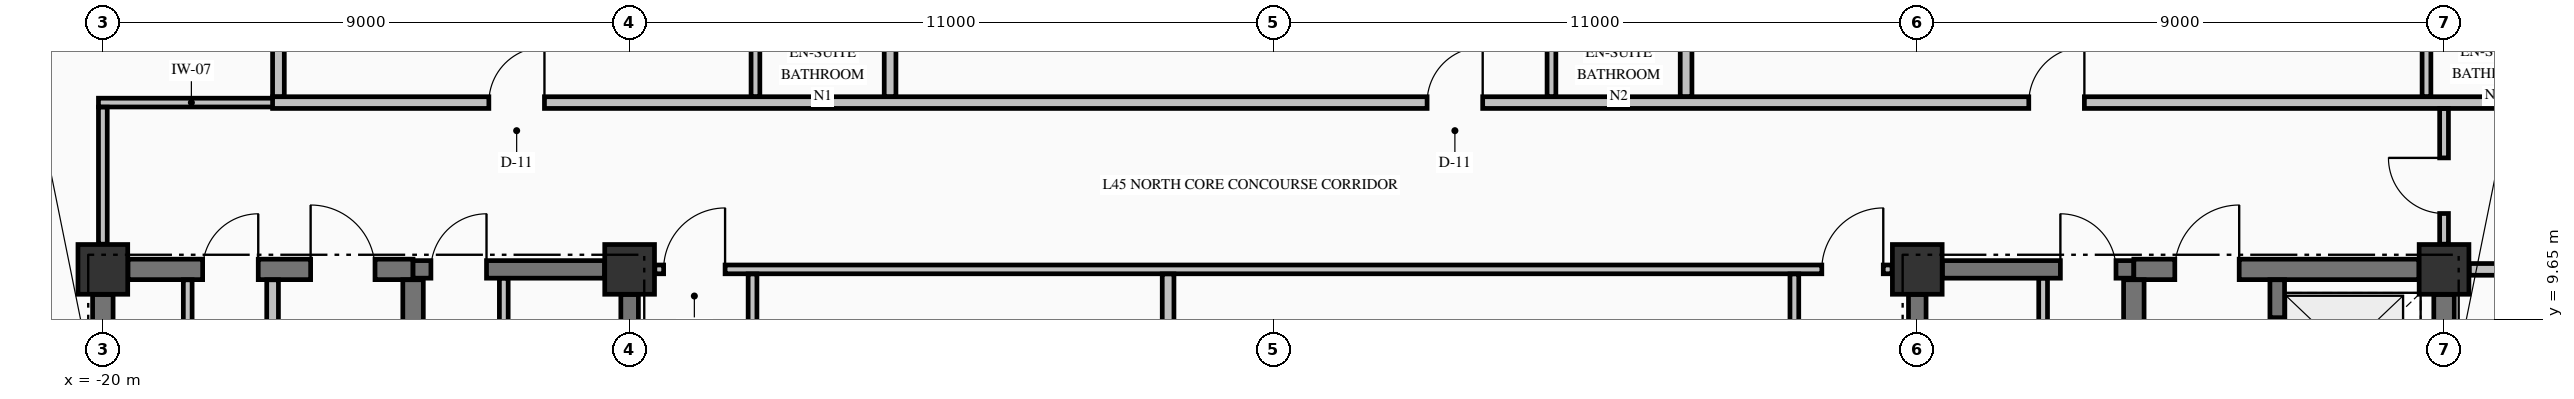
"""IFC4 building model, lengths in metres.
Left out: names, types, materials, properties, quantities, classifications, styles, units other than length and angle.
Written with IfcOpenShell. Run it as: python <this file> out.ifc"""

import sys

from ifc_helpers import new_model, si_unit, direction, frame, frame_2d, origin, origin_2d, place, context, subcontext, project, spatial, rectangle, extrude, element, fill, save


model = new_model("IFC4")
c1 = context("Model", 3, precision=1e-05, world=origin(), true_north=direction((0.0, 1.0)))
c2 = subcontext(c1, "Body", "Model", "MODEL_VIEW")
j1 = project(units=[si_unit("LENGTHUNIT", "METRE"), si_unit("PLANEANGLEUNIT", "RADIAN")], contexts=[c1])
p1 = place(None, origin())
s1 = spatial("IfcSite", under=j1, at=p1, CompositionType="ELEMENT")
p2 = place(p1, origin())
s2 = spatial("IfcBuilding", under=s1, at=p2, CompositionType="ELEMENT")
p3 = place(p2, frame((0.0, 0.0, 176.26)))
s3 = spatial("IfcBuildingStorey", under=s2, at=p3, CompositionType="ELEMENT", Elevation=176.26)
for number, where, z_axis, x_axis in (
    (1, (-20.0, 10.5, -0.275), (0.0, 0.0, 1.0), (1.0, 0.0, 0.0)),
    (2, (-11.0, 10.5, -0.275), (0.0, 0.0, 1.0), (1.0, 0.0, 0.0)),
    (3, (11.0, 10.5, -0.275), (0.0, 0.0, 1.0), (1.0, 0.0, 0.0)),
    (4, (20.0, 10.5, -0.275), (0.0, 0.0, 1.0), (1.0, 0.0, 0.0)),
):
    element("IfcColumn", number, at=place(p3, frame(where, z_axis=z_axis, x_axis=x_axis)), inside=s3, PredefinedType="COLUMN", context=c2, shape_type="SweptSolid", body=[
        extrude(rectangle(XDim=0.85, YDim=0.85, at=origin_2d()), origin(), (0.0, 0.0, 1.0), 3.425),
    ])
p4 = place(p3, frame((-19.571, 10.5, 0.0), z_axis=(0.0, 0.0, 1.0), x_axis=(1.0, 0.0, 0.0)))
e5 = element("IfcWall", 5, at=p4, inside=s3, PredefinedType="SHEAR", context=c2, shape_type="SweptSolid", body=[
    extrude(rectangle(XDim=4.871, YDim=0.35, at=frame_2d((2.436, 0.0))), origin(), (0.0, 0.0, 1.0), 3.15),
])
p5 = place(p4, frame((3.121, 0.0, 0.0)))
e6 = element("IfcOpeningElement", 6, at=p5, cuts=e5, PredefinedType="OPENING", context=c2, shape_type="SweptSolid", body=[
    extrude(rectangle(XDim=1.1, YDim=2.15, at=frame_2d((0.55, 1.075))), frame((0.0, 0.185, 0.0), z_axis=(0.0, -1.0, 0.0), x_axis=(1.0, 0.0, 0.0)), (0.0, 0.0, 1.0), 0.37),
])
p6 = place(p4, frame((1.276, 0.0, 0.0)))
e7 = element("IfcOpeningElement", 7, at=p6, cuts=e5, PredefinedType="OPENING", context=c2, shape_type="SweptSolid", body=[
    extrude(rectangle(XDim=0.95, YDim=2.15, at=frame_2d((0.475, 1.075))), frame((0.0, 0.185, 0.0), z_axis=(0.0, -1.0, 0.0), x_axis=(1.0, 0.0, 0.0)), (0.0, 0.0, 1.0), 0.37),
])
p7 = place(p3, frame((-14.7, 10.5, 0.0), z_axis=(0.0, 0.0, 1.0), x_axis=(1.0, 0.0, 0.0)))
e8 = element("IfcWall", 8, at=p7, inside=s3, PredefinedType="SHEAR", context=c2, shape_type="SweptSolid", body=[
    extrude(rectangle(XDim=3.271, YDim=0.3, at=frame_2d((1.635, 0.0))), origin(), (0.0, 0.0, 1.0), 3.15),
])
p8 = place(p7, frame((0.305, 0.0, 0.0)))
e9 = element("IfcOpeningElement", 9, at=p8, cuts=e8, PredefinedType="OPENING", context=c2, shape_type="SweptSolid", body=[
    extrude(rectangle(XDim=0.95, YDim=2.15, at=frame_2d((0.475, 1.075))), frame((0.0, 0.16, 0.0), z_axis=(0.0, -1.0, 0.0), x_axis=(1.0, 0.0, 0.0)), (0.0, 0.0, 1.0), 0.32),
])
p9 = place(p3, frame((11.429, 10.5, 0.0), z_axis=(0.0, 0.0, 1.0), x_axis=(1.0, 0.0, 0.0)))
e10 = element("IfcWall", 10, at=p9, inside=s3, PredefinedType="SHEAR", context=c2, shape_type="SweptSolid", body=[
    extrude(rectangle(XDim=3.271, YDim=0.3, at=frame_2d((1.635, 0.0))), origin(), (0.0, 0.0, 1.0), 3.15),
])
p10 = place(p9, frame((2.016, 0.0, 0.0)))
e11 = element("IfcOpeningElement", 11, at=p10, cuts=e10, PredefinedType="OPENING", context=c2, shape_type="SweptSolid", body=[
    extrude(rectangle(XDim=0.95, YDim=2.15, at=frame_2d((0.475, 1.075))), frame((0.0, 0.16, 0.0), z_axis=(0.0, -1.0, 0.0), x_axis=(1.0, 0.0, 0.0)), (0.0, 0.0, 1.0), 0.32),
])
p11 = place(p3, frame((14.7, 10.5, 0.0), z_axis=(0.0, 0.0, 1.0), x_axis=(1.0, 0.0, 0.0)))
e12 = element("IfcWall", 12, at=p11, inside=s3, PredefinedType="SHEAR", context=c2, shape_type="SweptSolid", body=[
    extrude(rectangle(XDim=4.871, YDim=0.35, at=frame_2d((2.436, 0.0))), origin(), (0.0, 0.0, 1.0), 3.15),
])
p12 = place(p11, frame((0.7, 0.0, 0.0)))
e13 = element("IfcOpeningElement", 13, at=p12, cuts=e12, PredefinedType="OPENING", context=c2, shape_type="SweptSolid", body=[
    extrude(rectangle(XDim=1.1, YDim=2.15, at=frame_2d((0.55, 1.075))), frame((0.0, 0.185, 0.0), z_axis=(0.0, -1.0, 0.0), x_axis=(1.0, 0.0, 0.0)), (0.0, 0.0, 1.0), 0.37),
])
p13 = place(p3, frame((-10.569, 10.5, 0.0), z_axis=(0.0, 0.0, 1.0), x_axis=(1.0, 0.0, 0.0)))
e14 = element("IfcWall", 14, at=p13, inside=s3, PredefinedType="PARTITIONING", context=c2, shape_type="SweptSolid", body=[
    extrude(rectangle(XDim=21.138, YDim=0.15, at=frame_2d((10.569, 0.0))), origin(), (0.0, 0.0, 1.0), 3.15),
])
p14 = place(p13, frame((0.15, 0.0, 0.0)))
e15 = element("IfcOpeningElement", 15, at=p14, cuts=e14, PredefinedType="OPENING", context=c2, shape_type="SweptSolid", body=[
    extrude(rectangle(XDim=1.05, YDim=2.15, at=frame_2d((0.525, 1.075))), frame((0.0, 0.085, 0.0), z_axis=(0.0, -1.0, 0.0), x_axis=(1.0, 0.0, 0.0)), (0.0, 0.0, 1.0), 0.17),
])
p15 = place(p13, frame((19.938, 0.0, 0.0)))
e16 = element("IfcOpeningElement", 16, at=p15, cuts=e14, PredefinedType="OPENING", context=c2, shape_type="SweptSolid", body=[
    extrude(rectangle(XDim=1.05, YDim=2.15, at=frame_2d((0.525, 1.075))), frame((0.0, 0.085, 0.0), z_axis=(0.0, -1.0, 0.0), x_axis=(1.0, 0.0, 0.0)), (0.0, 0.0, 1.0), 0.17),
])
p16 = place(p3, frame((20.431, 10.5, 0.0), z_axis=(0.0, 0.0, 1.0), x_axis=(1.0, 0.0, 0.0)))
e17 = element("IfcWall", 17, at=p16, inside=s3, PredefinedType="PARTITIONING", context=c2, shape_type="SweptSolid", body=[
    extrude(rectangle(XDim=6.404, YDim=0.2, at=frame_2d((3.202, 0.0))), origin(), (0.0, 0.0, 1.0), 3.15),
])
p17 = place(p16, frame((2.594, 0.0, 0.0)))
e18 = element("IfcOpeningElement", 18, at=p17, cuts=e17, PredefinedType="OPENING", context=c2, shape_type="SweptSolid", body=[
    extrude(rectangle(XDim=0.95, YDim=2.15, at=frame_2d((0.475, 1.075))), frame((0.0, 0.11, 0.0), z_axis=(0.0, -1.0, 0.0), x_axis=(1.0, 0.0, 0.0)), (0.0, 0.0, 1.0), 0.22),
])
p18 = place(p3, frame((-20.075, 13.35, 0.0), z_axis=(0.0, 0.0, 1.0), x_axis=(1.0, 0.0, 0.0)))
e19 = element("IfcWall", 19, at=p18, inside=s3, PredefinedType="PARTITIONING", context=c2, shape_type="SweptSolid", body=[
    extrude(rectangle(XDim=3.175, YDim=0.15, at=frame_2d((1.587, 0.0))), origin(), (0.0, 0.0, 1.0), 3.15),
])
p19 = place(p3, frame((-17.1, 13.35, 0.0), z_axis=(0.0, 0.0, 1.0), x_axis=(1.0, 0.0, 0.0)))
e20 = element("IfcWall", 20, at=p19, inside=s3, PredefinedType="PARTITIONING", context=c2, shape_type="SweptSolid", body=[
    extrude(rectangle(XDim=39.2, YDim=0.2, at=frame_2d((19.6, 0.0))), origin(), (0.0, 0.0, 1.0), 3.15),
])
p20 = place(p19, frame((3.695, 0.0, 0.0)))
e21 = element("IfcOpeningElement", 21, at=p20, cuts=e20, PredefinedType="OPENING", context=c2, shape_type="SweptSolid", body=[
    extrude(rectangle(XDim=0.95, YDim=2.15, at=frame_2d((0.475, 1.075))), frame((0.0, 0.11, 0.0), z_axis=(0.0, -1.0, 0.0), x_axis=(1.0, 0.0, 0.0)), (0.0, 0.0, 1.0), 0.22),
])
p21 = place(p19, frame((19.725, 0.0, 0.0)))
e22 = element("IfcOpeningElement", 22, at=p21, cuts=e20, PredefinedType="OPENING", context=c2, shape_type="SweptSolid", body=[
    extrude(rectangle(XDim=0.95, YDim=2.15, at=frame_2d((0.475, 1.075))), frame((0.0, 0.11, 0.0), z_axis=(0.0, -1.0, 0.0), x_axis=(1.0, 0.0, 0.0)), (0.0, 0.0, 1.0), 0.22),
])
p22 = place(p19, frame((30.005, 0.0, 0.0)))
e23 = element("IfcOpeningElement", 23, at=p22, cuts=e20, PredefinedType="OPENING", context=c2, shape_type="SweptSolid", body=[
    extrude(rectangle(XDim=0.95, YDim=2.15, at=frame_2d((0.475, 1.075))), frame((0.0, 0.11, 0.0), z_axis=(0.0, -1.0, 0.0), x_axis=(1.0, 0.0, 0.0)), (0.0, 0.0, 1.0), 0.22),
])
p23 = place(p3, frame((-20.0, 5.327, 0.0), z_axis=(0.0, 0.0, 1.0), x_axis=(0.0, 1.0, 0.0)))
e24 = element("IfcWall", 24, at=p23, inside=s3, PredefinedType="SHEAR", context=c2, shape_type="SweptSolid", body=[
    extrude(rectangle(XDim=4.744, YDim=0.35, at=frame_2d((2.372, 0.0))), origin(), (0.0, 0.0, 1.0), 3.15),
])
p24 = place(p3, frame((-14.7, 5.852, 0.0), z_axis=(0.0, 0.0, 1.0), x_axis=(0.0, 1.0, 0.0)))
e25 = element("IfcWall", 25, at=p24, inside=s3, PredefinedType="SHEAR", context=c2, shape_type="SweptSolid", body=[
    extrude(rectangle(XDim=4.471, YDim=0.35, at=frame_2d((2.235, 0.0))), origin(), (0.0, 0.0, 1.0), 3.15),
])
for number, where, z_axis, x_axis in (
    (26, (-11.0, 5.852, 0.0), (0.0, 0.0, 1.0), (0.0, 1.0, 0.0)),
    (27, (11.0, 5.852, 0.0), (0.0, 0.0, 1.0), (0.0, 1.0, 0.0)),
):
    element("IfcWall", number, at=place(p3, frame(where, z_axis=z_axis, x_axis=x_axis)), inside=s3, PredefinedType="SHEAR", context=c2, shape_type="SweptSolid", body=[
        extrude(rectangle(XDim=4.219, YDim=0.3, at=frame_2d((2.109, 0.0))), origin(), (0.0, 0.0, 1.0), 3.15),
    ])
p25 = place(p3, frame((14.7, 5.852, 0.0), z_axis=(0.0, 0.0, 1.0), x_axis=(0.0, 1.0, 0.0)))
e28 = element("IfcWall", 28, at=p25, inside=s3, PredefinedType="SHEAR", context=c2, shape_type="SweptSolid", body=[
    extrude(rectangle(XDim=4.471, YDim=0.35, at=frame_2d((2.235, 0.0))), origin(), (0.0, 0.0, 1.0), 3.15),
])
p26 = place(p3, frame((17.15, 7.877, 0.0), z_axis=(0.0, 0.0, 1.0), x_axis=(0.0, 1.0, 0.0)))
e29 = element("IfcWall", 29, at=p26, inside=s3, PredefinedType="SOLIDWALL", context=c2, shape_type="SweptSolid", body=[
    extrude(rectangle(XDim=2.446, YDim=0.25, at=frame_2d((1.223, 0.0))), origin(), (0.0, 0.0, 1.0), 3.15),
])
p27 = place(p26, frame((0.698, 0.0, 0.0)))
e30 = element("IfcOpeningElement", 30, at=p27, cuts=e29, PredefinedType="OPENING", context=c2, shape_type="SweptSolid", body=[
    extrude(rectangle(XDim=1.1, YDim=2.2, at=frame_2d((0.55, 1.1))), frame((0.0, 0.135, 0.0), z_axis=(0.0, -1.0, 0.0), x_axis=(1.0, 0.0, 0.0)), (0.0, 0.0, 1.0), 0.27),
])
p28 = place(p3, frame((20.0, 7.877, 0.0), z_axis=(0.0, 0.0, 1.0), x_axis=(0.0, 1.0, 0.0)))
e31 = element("IfcWall", 31, at=p28, inside=s3, PredefinedType="SHEAR", context=c2, shape_type="SweptSolid", body=[
    extrude(rectangle(XDim=2.194, YDim=0.35, at=frame_2d((1.097, 0.0))), origin(), (0.0, 0.0, 1.0), 3.15),
])
p29 = place(p3, frame((-20.0, 10.931, 0.0), z_axis=(0.0, 0.0, 1.0), x_axis=(0.0, 1.0, 0.0)))
e32 = element("IfcWall", 32, at=p29, inside=s3, PredefinedType="PARTITIONING", context=c2, shape_type="SweptSolid", body=[
    extrude(rectangle(XDim=2.341, YDim=0.15, at=frame_2d((1.17, 0.0))), origin(), (0.0, 0.0, 1.0), 2.342),
])
p30 = place(p3, frame((-18.55, 5.328, 0.0), z_axis=(0.0, 0.0, 1.0), x_axis=(0.0, 1.0, 0.0)))
e33 = element("IfcWall", 33, at=p30, inside=s3, PredefinedType="PARTITIONING", context=c2, shape_type="SweptSolid", body=[
    extrude(rectangle(XDim=4.994, YDim=0.15, at=frame_2d((2.497, 0.0))), origin(), (0.0, 0.0, 1.0), 3.15),
])
p31 = place(p30, frame((2.047, 0.0, 0.0)))
e34 = element("IfcOpeningElement", 34, at=p31, cuts=e33, PredefinedType="OPENING", context=c2, shape_type="SweptSolid", body=[
    extrude(rectangle(XDim=0.95, YDim=2.15, at=frame_2d((0.475, 1.075))), frame((0.0, 0.085, 0.0), z_axis=(0.0, -1.0, 0.0), x_axis=(1.0, 0.0, 0.0)), (0.0, 0.0, 1.0), 0.17),
])
p32 = place(p3, frame((-17.1, 5.328, 0.0), z_axis=(0.0, 0.0, 1.0), x_axis=(0.0, 1.0, 0.0)))
e35 = element("IfcWall", 35, at=p32, inside=s3, PredefinedType="PARTITIONING", context=c2, shape_type="SweptSolid", body=[
    extrude(rectangle(XDim=4.994, YDim=0.2, at=frame_2d((2.497, 0.0))), origin(), (0.0, 0.0, 1.0), 3.15),
])
p33 = place(p3, frame((-17.0, 13.453, 0.0), z_axis=(0.0, 0.0, 1.0), x_axis=(0.0, 1.0, 0.0)))
e36 = element("IfcWall", 36, at=p33, inside=s3, PredefinedType="PARTITIONING", context=c2, shape_type="SweptSolid", body=[
    extrude(rectangle(XDim=5.541, YDim=0.2, at=frame_2d((2.771, 0.0))), origin(), (0.0, 0.0, 1.0), 3.15),
])
p34 = place(p3, frame((-13.15, 7.228, 0.0), z_axis=(0.0, 0.0, 1.0), x_axis=(0.0, 1.0, 0.0)))
e37 = element("IfcWall", 37, at=p34, inside=s3, PredefinedType="PARTITIONING", context=c2, shape_type="SweptSolid", body=[
    extrude(rectangle(XDim=3.119, YDim=0.15, at=frame_2d((1.56, 0.0))), origin(), (0.0, 0.0, 1.0), 3.15),
])
p35 = place(p34, frame((1.097, 0.0, 0.0)))
e38 = element("IfcOpeningElement", 38, at=p35, cuts=e37, PredefinedType="OPENING", context=c2, shape_type="SweptSolid", body=[
    extrude(rectangle(XDim=0.95, YDim=2.15, at=frame_2d((0.475, 1.075))), frame((0.0, 0.085, 0.0), z_axis=(0.0, -1.0, 0.0), x_axis=(1.0, 0.0, 0.0)), (0.0, 0.0, 1.0), 0.17),
])
p36 = place(p3, frame((-8.9, 4.053, 0.0), z_axis=(0.0, 0.0, 1.0), x_axis=(0.0, 1.0, 0.0)))
e39 = element("IfcWall", 39, at=p36, inside=s3, PredefinedType="PARTITIONING", context=c2, shape_type="SweptSolid", body=[
    extrude(rectangle(XDim=6.369, YDim=0.15, at=frame_2d((3.185, 0.0))), origin(), (0.0, 0.0, 1.0), 3.15),
])
p37 = place(p36, frame((2.667, 0.0, 0.0)))
e40 = element("IfcOpeningElement", 40, at=p37, cuts=e39, PredefinedType="OPENING", context=c2, shape_type="SweptSolid", body=[
    extrude(rectangle(XDim=1.0, YDim=2.15, at=frame_2d((0.5, 1.075))), frame((0.0, 0.085, 0.0), z_axis=(0.0, -1.0, 0.0), x_axis=(1.0, 0.0, 0.0)), (0.0, 0.0, 1.0), 0.17),
])
p38 = place(p3, frame((-8.85, 13.453, 0.0), z_axis=(0.0, 0.0, 1.0), x_axis=(0.0, 1.0, 0.0)))
e41 = element("IfcWall", 41, at=p38, inside=s3, PredefinedType="PARTITIONING", context=c2, shape_type="SweptSolid", body=[
    extrude(rectangle(XDim=2.069, YDim=0.15, at=frame_2d((1.035, 0.0))), origin(), (0.0, 0.0, 1.0), 3.15),
])
p39 = place(p3, frame((-6.55, 13.453, 0.0), z_axis=(0.0, 0.0, 1.0), x_axis=(0.0, 1.0, 0.0)))
e42 = element("IfcWall", 42, at=p39, inside=s3, PredefinedType="PARTITIONING", context=c2, shape_type="SweptSolid", body=[
    extrude(rectangle(XDim=2.069, YDim=0.2, at=frame_2d((1.035, 0.0))), origin(), (0.0, 0.0, 1.0), 3.15),
])
p40 = place(p3, frame((-1.8, 4.053, 0.0), z_axis=(0.0, 0.0, 1.0), x_axis=(0.0, 1.0, 0.0)))
e43 = element("IfcWall", 43, at=p40, inside=s3, PredefinedType="PARTITIONING", context=c2, shape_type="SweptSolid", body=[
    extrude(rectangle(XDim=6.369, YDim=0.2, at=frame_2d((3.185, 0.0))), origin(), (0.0, 0.0, 1.0), 3.15),
])
p41 = place(p3, frame((4.75, 13.453, 0.0), z_axis=(0.0, 0.0, 1.0), x_axis=(0.0, 1.0, 0.0)))
e44 = element("IfcWall", 44, at=p41, inside=s3, PredefinedType="PARTITIONING", context=c2, shape_type="SweptSolid", body=[
    extrude(rectangle(XDim=2.069, YDim=0.15, at=frame_2d((1.035, 0.0))), origin(), (0.0, 0.0, 1.0), 3.15),
])
p42 = place(p3, frame((7.05, 13.453, 0.0), z_axis=(0.0, 0.0, 1.0), x_axis=(0.0, 1.0, 0.0)))
e45 = element("IfcWall", 45, at=p42, inside=s3, PredefinedType="PARTITIONING", context=c2, shape_type="SweptSolid", body=[
    extrude(rectangle(XDim=2.069, YDim=0.2, at=frame_2d((1.035, 0.0))), origin(), (0.0, 0.0, 1.0), 3.15),
])
p43 = place(p3, frame((8.9, -1.497, 0.0), z_axis=(0.0, 0.0, 1.0), x_axis=(0.0, 1.0, 0.0)))
e46 = element("IfcWall", 46, at=p43, inside=s3, PredefinedType="PARTITIONING", context=c2, shape_type="SweptSolid", body=[
    extrude(rectangle(XDim=11.919, YDim=0.15, at=frame_2d((5.959, 0.0))), origin(), (0.0, 0.0, 1.0), 3.15),
])
p44 = place(p43, frame((5.397, 0.0, 0.0)))
e47 = element("IfcOpeningElement", 47, at=p44, cuts=e46, PredefinedType="OPENING", context=c2, shape_type="SweptSolid", body=[
    extrude(rectangle(XDim=1.1, YDim=2.15, at=frame_2d((0.55, 1.075))), frame((0.0, 0.085, 0.0), z_axis=(0.0, -1.0, 0.0), x_axis=(1.0, 0.0, 0.0)), (0.0, 0.0, 1.0), 0.17),
])
p45 = place(p3, frame((13.15, 7.228, 0.0), z_axis=(0.0, 0.0, 1.0), x_axis=(0.0, 1.0, 0.0)))
e48 = element("IfcWall", 48, at=p45, inside=s3, PredefinedType="PARTITIONING", context=c2, shape_type="SweptSolid", body=[
    extrude(rectangle(XDim=3.119, YDim=0.15, at=frame_2d((1.56, 0.0))), origin(), (0.0, 0.0, 1.0), 3.15),
])
p46 = place(p45, frame((1.097, 0.0, 0.0)))
e49 = element("IfcOpeningElement", 49, at=p46, cuts=e48, PredefinedType="OPENING", context=c2, shape_type="SweptSolid", body=[
    extrude(rectangle(XDim=0.95, YDim=2.15, at=frame_2d((0.475, 1.075))), frame((0.0, 0.085, 0.0), z_axis=(0.0, -1.0, 0.0), x_axis=(1.0, 0.0, 0.0)), (0.0, 0.0, 1.0), 0.17),
])
p47 = place(p3, frame((19.7, 13.453, 0.0), z_axis=(0.0, 0.0, 1.0), x_axis=(0.0, 1.0, 0.0)))
e50 = element("IfcWall", 50, at=p47, inside=s3, PredefinedType="PARTITIONING", context=c2, shape_type="SweptSolid", body=[
    extrude(rectangle(XDim=2.069, YDim=0.15, at=frame_2d((1.035, 0.0))), origin(), (0.0, 0.0, 1.0), 2.342),
])
p48 = place(p3, frame((20.0, 10.931, 0.0), z_axis=(0.0, 0.0, 1.0), x_axis=(0.0, 1.0, 0.0)))
e51 = element("IfcWall", 51, at=p48, inside=s3, PredefinedType="PARTITIONING", context=c2, shape_type="SweptSolid", body=[
    extrude(rectangle(XDim=2.316, YDim=0.15, at=frame_2d((1.158, 0.0))), origin(), (0.0, 0.0, 1.0), 2.342),
])
p49 = place(p48, frame((0.524, 0.0, 0.0)))
e52 = element("IfcOpeningElement", 52, at=p49, cuts=e51, PredefinedType="OPENING", context=c2, shape_type="SweptSolid", body=[
    extrude(rectangle(XDim=0.95, YDim=2.15, at=frame_2d((0.475, 1.075))), frame((0.0, 0.085, 0.0), z_axis=(0.0, -1.0, 0.0), x_axis=(1.0, 0.0, 0.0)), (0.0, 0.0, 1.0), 0.17),
])
p50 = place(p8, origin())
e53 = element("IfcDoor", 53, at=p50, inside=s3, OperationType="SINGLE_SWING_RIGHT", PredefinedType="DOOR", context=c2, shape_type="SweptSolid", body=[
    extrude(rectangle(XDim=0.95, YDim=2.15, at=frame_2d((0.475, 1.075))), frame((0.0, 0.025, 0.0), z_axis=(0.0, -1.0, 0.0), x_axis=(1.0, 0.0, 0.0)), (0.0, 0.0, 1.0), 0.05),
])
fill(e9, e53)
p51 = place(p10, origin())
e54 = element("IfcDoor", 54, at=p51, inside=s3, OperationType="SINGLE_SWING_LEFT", PredefinedType="DOOR", context=c2, shape_type="SweptSolid", body=[
    extrude(rectangle(XDim=0.95, YDim=2.15, at=frame_2d((0.475, 1.075))), frame((0.0, 0.025, 0.0), z_axis=(0.0, -1.0, 0.0), x_axis=(1.0, 0.0, 0.0)), (0.0, 0.0, 1.0), 0.05),
])
fill(e11, e54)
p52 = place(p5, origin())
e55 = element("IfcDoor", 55, at=p52, inside=s3, OperationType="SINGLE_SWING_LEFT", PredefinedType="DOOR", context=c2, shape_type="SweptSolid", body=[
    extrude(rectangle(XDim=1.1, YDim=2.15, at=frame_2d((0.55, 1.075))), frame((0.0, 0.025, 0.0), z_axis=(0.0, -1.0, 0.0), x_axis=(1.0, 0.0, 0.0)), (0.0, 0.0, 1.0), 0.05),
])
fill(e6, e55)
p53 = place(p6, origin())
e56 = element("IfcDoor", 56, at=p53, inside=s3, OperationType="SINGLE_SWING_RIGHT", PredefinedType="DOOR", context=c2, shape_type="SweptSolid", body=[
    extrude(rectangle(XDim=0.95, YDim=2.15, at=frame_2d((0.475, 1.075))), frame((0.0, 0.025, 0.0), z_axis=(0.0, -1.0, 0.0), x_axis=(1.0, 0.0, 0.0)), (0.0, 0.0, 1.0), 0.05),
])
fill(e7, e56)
p54 = place(p27, origin())
e57 = element("IfcDoor", 57, at=p54, inside=s3, OperationType="SLIDING_TO_RIGHT", PredefinedType="DOOR", context=c2, shape_type="SweptSolid", body=[
    extrude(rectangle(XDim=1.1, YDim=2.2, at=frame_2d((0.55, 1.1))), frame((0.0, 0.025, 0.0), z_axis=(0.0, -1.0, 0.0), x_axis=(1.0, 0.0, 0.0)), (0.0, 0.0, 1.0), 0.05),
])
fill(e30, e57)
p55 = place(p12, origin())
e58 = element("IfcDoor", 58, at=p55, inside=s3, OperationType="SINGLE_SWING_RIGHT", PredefinedType="DOOR", context=c2, shape_type="SweptSolid", body=[
    extrude(rectangle(XDim=1.1, YDim=2.15, at=frame_2d((0.55, 1.075))), frame((0.0, 0.025, 0.0), z_axis=(0.0, -1.0, 0.0), x_axis=(1.0, 0.0, 0.0)), (0.0, 0.0, 1.0), 0.05),
])
fill(e13, e58)
p56 = place(p14, origin())
e59 = element("IfcDoor", 59, at=p56, inside=s3, OperationType="SINGLE_SWING_RIGHT", PredefinedType="DOOR", context=c2, shape_type="SweptSolid", body=[
    extrude(rectangle(XDim=1.05, YDim=2.15, at=frame_2d((0.525, 1.075))), frame((0.0, 0.025, 0.0), z_axis=(0.0, -1.0, 0.0), x_axis=(1.0, 0.0, 0.0)), (0.0, 0.0, 1.0), 0.05),
])
fill(e15, e59)
p57 = place(p15, origin())
e60 = element("IfcDoor", 60, at=p57, inside=s3, OperationType="SINGLE_SWING_RIGHT", PredefinedType="DOOR", context=c2, shape_type="SweptSolid", body=[
    extrude(rectangle(XDim=1.05, YDim=2.15, at=frame_2d((0.525, 1.075))), frame((0.0, 0.025, 0.0), z_axis=(0.0, -1.0, 0.0), x_axis=(1.0, 0.0, 0.0)), (0.0, 0.0, 1.0), 0.05),
])
fill(e16, e60)
p58 = place(p20, origin())
e61 = element("IfcDoor", 61, at=p58, inside=s3, OperationType="SINGLE_SWING_RIGHT", PredefinedType="DOOR", context=c2, shape_type="SweptSolid", body=[
    extrude(rectangle(XDim=0.95, YDim=2.15, at=frame_2d((0.475, 1.075))), frame((0.0, 0.025, 0.0), z_axis=(0.0, -1.0, 0.0), x_axis=(1.0, 0.0, 0.0)), (0.0, 0.0, 1.0), 0.05),
])
fill(e21, e61)
p59 = place(p21, origin())
e62 = element("IfcDoor", 62, at=p59, inside=s3, OperationType="SINGLE_SWING_RIGHT", PredefinedType="DOOR", context=c2, shape_type="SweptSolid", body=[
    extrude(rectangle(XDim=0.95, YDim=2.15, at=frame_2d((0.475, 1.075))), frame((0.0, 0.025, 0.0), z_axis=(0.0, -1.0, 0.0), x_axis=(1.0, 0.0, 0.0)), (0.0, 0.0, 1.0), 0.05),
])
fill(e22, e62)
p60 = place(p22, origin())
e63 = element("IfcDoor", 63, at=p60, inside=s3, OperationType="SINGLE_SWING_RIGHT", PredefinedType="DOOR", context=c2, shape_type="SweptSolid", body=[
    extrude(rectangle(XDim=0.95, YDim=2.15, at=frame_2d((0.475, 1.075))), frame((0.0, 0.025, 0.0), z_axis=(0.0, -1.0, 0.0), x_axis=(1.0, 0.0, 0.0)), (0.0, 0.0, 1.0), 0.05),
])
fill(e23, e63)
p61 = place(p49, origin())
e64 = element("IfcDoor", 64, at=p61, inside=s3, OperationType="SINGLE_SWING_RIGHT", PredefinedType="DOOR", context=c2, shape_type="SweptSolid", body=[
    extrude(rectangle(XDim=0.95, YDim=2.15, at=frame_2d((0.475, 1.075))), frame((0.0, 0.025, 0.0), z_axis=(0.0, -1.0, 0.0), x_axis=(1.0, 0.0, 0.0)), (0.0, 0.0, 1.0), 0.05),
])
fill(e52, e64)
save(model, sys.argv[1])
